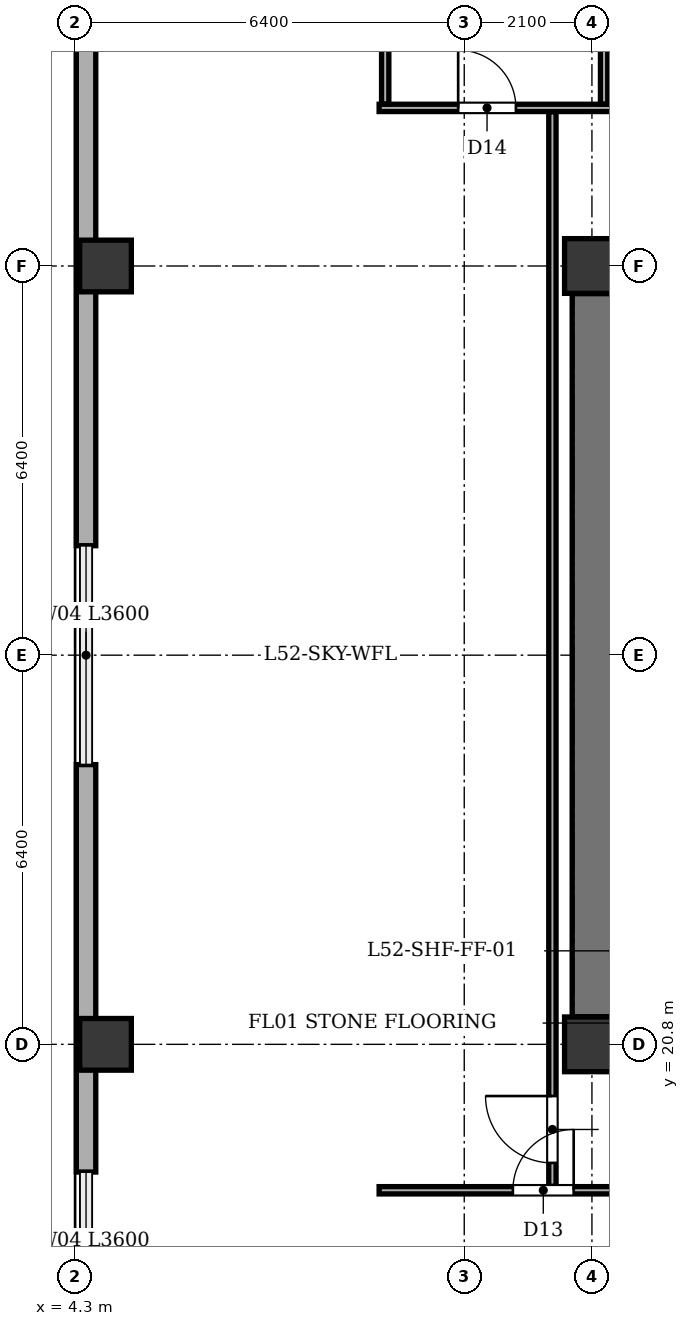
"""IFC4 building model, lengths in metres.
Left out: names, types, materials, properties, quantities, classifications, styles, units other than length and angle.
Written with IfcOpenShell. Run it as: python <this file> out.ifc"""

import sys

from ifc_helpers import new_model, si_unit, direction, frame, frame_2d, origin, origin_2d, place, context, subcontext, project, spatial, rectangle, extrude, element, fill, save


model = new_model("IFC4")
c1 = context("Model", 3, precision=1e-05, world=origin(), true_north=direction((0.0, 1.0)))
c2 = subcontext(c1, "Body", "Model", "MODEL_VIEW")
j1 = project(units=[si_unit("LENGTHUNIT", "METRE"), si_unit("PLANEANGLEUNIT", "RADIAN")], contexts=[c1])
p1 = place(None, origin())
s1 = spatial("IfcSite", under=j1, at=p1, CompositionType="ELEMENT")
p2 = place(p1, origin())
s2 = spatial("IfcBuilding", under=s1, at=p2, CompositionType="ELEMENT")
p3 = place(p2, frame((0.0, 0.0, 202.7)))
s3 = spatial("IfcBuildingStorey", under=s2, at=p3, CompositionType="ELEMENT", Elevation=202.7)
for number, where, z_axis, x_axis in (
    (1, (12.8, 20.8, 0.0), (0.0, 0.0, 1.0), (1.0, 0.0, 0.0)),
    (2, (12.8, 33.6, 0.0), (0.0, 0.0, 1.0), (1.0, 0.0, 0.0)),
):
    element("IfcColumn", number, at=place(p3, frame(where, z_axis=z_axis, x_axis=x_axis)), inside=s3, PredefinedType="COLUMN", context=c2, shape_type="SweptSolid", body=[
        extrude(rectangle(XDim=0.9, YDim=0.9, at=origin_2d()), origin(), (0.0, 0.0, 1.0), 4.8),
    ])
for number, where, z_axis, x_axis in (
    (3, (4.8, 20.8, 0.0), (0.0, 0.0, 1.0), (1.0, 0.0, 0.0)),
    (4, (4.8, 33.6, 0.0), (0.0, 0.0, 1.0), (1.0, 0.0, 0.0)),
):
    element("IfcColumn", number, at=place(p3, frame(where, z_axis=z_axis, x_axis=x_axis)), inside=s3, PredefinedType="COLUMN", context=c2, shape_type="SweptSolid", body=[
        extrude(rectangle(XDim=0.85, YDim=0.85, at=origin_2d()), origin(), (0.0, 0.0, 1.0), 4.8),
    ])
p4 = place(p3, frame((4.48, 18.7, 0.0), z_axis=(0.0, 0.0, 1.0), x_axis=(0.0, 1.0, 0.0)))
e5 = element("IfcWall", 5, at=p4, inside=s3, PredefinedType="STANDARD", context=c2, shape_type="SweptSolid", body=[
    extrude(rectangle(XDim=6.7, YDim=0.32, at=frame_2d((3.35, 0.0))), origin(), (0.0, 0.0, 1.0), 3.735),
])
p5 = place(p3, frame((4.48, 29.0, 0.0), z_axis=(0.0, 0.0, 1.0), x_axis=(0.0, 1.0, 0.0)))
e6 = element("IfcWall", 6, at=p5, inside=s3, PredefinedType="STANDARD", context=c2, shape_type="SweptSolid", body=[
    extrude(rectangle(XDim=18.9, YDim=0.32, at=frame_2d((9.45, 0.0))), origin(), (0.0, 0.0, 1.0), 3.735),
])
p6 = place(p3, frame((12.8, 21.255, 0.0), z_axis=(0.0, 0.0, 1.0), x_axis=(0.0, 1.0, 0.0)))
e7 = element("IfcWall", 7, at=p6, inside=s3, PredefinedType="SHEAR", context=c2, shape_type="SweptSolid", body=[
    extrude(rectangle(XDim=11.89, YDim=0.65, at=frame_2d((5.945, 0.0))), origin(), (0.0, 0.0, 1.0), 4.35),
])
p7 = place(p3, frame((9.3, 18.4, 0.0), z_axis=(0.0, 0.0, 1.0), x_axis=(1.0, 0.0, 0.0)))
e8 = element("IfcWall", 8, at=p7, inside=s3, PredefinedType="PARTITIONING", context=c2, shape_type="SweptSolid", body=[
    extrude(rectangle(XDim=35.0, YDim=0.12, at=frame_2d((17.5, 0.0))), origin(), (0.0, 0.0, 1.0), 4.35),
])
p8 = place(p7, frame((2.2, 0.0, 0.0)))
e9 = element("IfcOpeningElement", 9, at=p8, cuts=e8, PredefinedType="OPENING", context=c2, shape_type="SweptSolid", body=[
    extrude(rectangle(XDim=1.0, YDim=2.1, at=frame_2d((0.5, 1.05))), frame((0.0, 0.07, 0.0), z_axis=(0.0, -1.0, 0.0), x_axis=(1.0, 0.0, 0.0)), (0.0, 0.0, 1.0), 0.14),
])
p9 = place(p7, frame((9.2, 0.0, 0.0)))
e10 = element("IfcOpeningElement", 10, at=p9, cuts=e8, PredefinedType="OPENING", context=c2, shape_type="SweptSolid", body=[
    extrude(rectangle(XDim=1.0, YDim=2.1, at=frame_2d((0.5, 1.05))), frame((0.0, 0.07, 0.0), z_axis=(0.0, -1.0, 0.0), x_axis=(1.0, 0.0, 0.0)), (0.0, 0.0, 1.0), 0.14),
])
p10 = place(p7, frame((16.55, 0.0, 0.0)))
e11 = element("IfcOpeningElement", 11, at=p10, cuts=e8, PredefinedType="OPENING", context=c2, shape_type="SweptSolid", body=[
    extrude(rectangle(XDim=1.0, YDim=2.1, at=frame_2d((0.5, 1.05))), frame((0.0, 0.07, 0.0), z_axis=(0.0, -1.0, 0.0), x_axis=(1.0, 0.0, 0.0)), (0.0, 0.0, 1.0), 0.14),
])
p11 = place(p7, frame((23.9, 0.0, 0.0)))
e12 = element("IfcOpeningElement", 12, at=p11, cuts=e8, PredefinedType="OPENING", context=c2, shape_type="SweptSolid", body=[
    extrude(rectangle(XDim=1.0, YDim=2.1, at=frame_2d((0.5, 1.05))), frame((0.0, 0.07, 0.0), z_axis=(0.0, -1.0, 0.0), x_axis=(1.0, 0.0, 0.0)), (0.0, 0.0, 1.0), 0.14),
])
p12 = place(p7, frame((30.55, 0.0, 0.0)))
e13 = element("IfcOpeningElement", 13, at=p12, cuts=e8, PredefinedType="OPENING", context=c2, shape_type="SweptSolid", body=[
    extrude(rectangle(XDim=1.0, YDim=2.1, at=frame_2d((0.5, 1.05))), frame((0.0, 0.07, 0.0), z_axis=(0.0, -1.0, 0.0), x_axis=(1.0, 0.0, 0.0)), (0.0, 0.0, 1.0), 0.14),
])
p13 = place(p3, frame((9.3, 36.2, 0.0), z_axis=(0.0, 0.0, 1.0), x_axis=(1.0, 0.0, 0.0)))
e14 = element("IfcWall", 14, at=p13, inside=s3, PredefinedType="PARTITIONING", context=c2, shape_type="SweptSolid", body=[
    extrude(rectangle(XDim=35.0, YDim=0.12, at=frame_2d((17.5, 0.0))), origin(), (0.0, 0.0, 1.0), 4.35),
])
p14 = place(p13, frame((1.3, 0.0, 0.0)))
e15 = element("IfcOpeningElement", 15, at=p14, cuts=e14, PredefinedType="OPENING", context=c2, shape_type="SweptSolid", body=[
    extrude(rectangle(XDim=0.95, YDim=2.1, at=frame_2d((0.475, 1.05))), frame((0.0, 0.07, 0.0), z_axis=(0.0, -1.0, 0.0), x_axis=(1.0, 0.0, 0.0)), (0.0, 0.0, 1.0), 0.14),
])
p15 = place(p13, frame((4.9, 0.0, 0.0)))
e16 = element("IfcOpeningElement", 16, at=p15, cuts=e14, PredefinedType="OPENING", context=c2, shape_type="SweptSolid", body=[
    extrude(rectangle(XDim=0.95, YDim=2.1, at=frame_2d((0.475, 1.05))), frame((0.0, 0.07, 0.0), z_axis=(0.0, -1.0, 0.0), x_axis=(1.0, 0.0, 0.0)), (0.0, 0.0, 1.0), 0.14),
])
p16 = place(p13, frame((8.3, 0.0, 0.0)))
e17 = element("IfcOpeningElement", 17, at=p16, cuts=e14, PredefinedType="OPENING", context=c2, shape_type="SweptSolid", body=[
    extrude(rectangle(XDim=1.0, YDim=2.1, at=frame_2d((0.5, 1.05))), frame((0.0, 0.07, 0.0), z_axis=(0.0, -1.0, 0.0), x_axis=(1.0, 0.0, 0.0)), (0.0, 0.0, 1.0), 0.14),
])
p17 = place(p13, frame((13.5, 0.0, 0.0)))
e18 = element("IfcOpeningElement", 18, at=p17, cuts=e14, PredefinedType="OPENING", context=c2, shape_type="SweptSolid", body=[
    extrude(rectangle(XDim=1.5, YDim=2.15, at=frame_2d((0.75, 1.075))), frame((0.0, 0.07, 0.0), z_axis=(0.0, -1.0, 0.0), x_axis=(1.0, 0.0, 0.0)), (0.0, 0.0, 1.0), 0.14),
])
p18 = place(p13, frame((28.0, 0.0, 0.0)))
e19 = element("IfcOpeningElement", 19, at=p18, cuts=e14, PredefinedType="OPENING", context=c2, shape_type="SweptSolid", body=[
    extrude(rectangle(XDim=1.0, YDim=2.1, at=frame_2d((0.5, 1.05))), frame((0.0, 0.07, 0.0), z_axis=(0.0, -1.0, 0.0), x_axis=(1.0, 0.0, 0.0)), (0.0, 0.0, 1.0), 0.14),
])
for number, where, z_axis, x_axis in (
    (20, (9.4, 36.265, 0.0), (0.0, 0.0, 1.0), (0.0, 1.0, 0.0)),
    (21, (13.0, 36.265, 0.0), (0.0, 0.0, 1.0), (0.0, 1.0, 0.0)),
):
    element("IfcWall", number, at=place(p3, frame(where, z_axis=z_axis, x_axis=x_axis)), inside=s3, PredefinedType="PARTITIONING", context=c2, shape_type="SweptSolid", body=[
        extrude(rectangle(XDim=16.29, YDim=0.12, at=frame_2d((8.145, 0.0))), origin(), (0.0, 0.0, 1.0), 4.35),
    ])
p19 = place(p3, frame((12.15, 18.465, 0.0), z_axis=(0.0, 0.0, 1.0), x_axis=(0.0, 1.0, 0.0)))
e22 = element("IfcWall", 22, at=p19, inside=s3, PredefinedType="PARTITIONING", context=c2, shape_type="SweptSolid", body=[
    extrude(rectangle(XDim=17.67, YDim=0.12, at=frame_2d((8.835, 0.0))), origin(), (0.0, 0.0, 1.0), 4.35),
])
p20 = place(p19, frame((0.385, 0.0, 0.0)))
e23 = element("IfcOpeningElement", 23, at=p20, cuts=e22, PredefinedType="OPENING", context=c2, shape_type="SweptSolid", body=[
    extrude(rectangle(XDim=1.1, YDim=2.15, at=frame_2d((0.55, 1.075))), frame((0.0, 0.07, 0.0), z_axis=(0.0, -1.0, 0.0), x_axis=(1.0, 0.0, 0.0)), (0.0, 0.0, 1.0), 0.14),
])
p21 = place(p8, origin())
e24 = element("IfcDoor", 24, at=p21, inside=s3, OperationType="SINGLE_SWING_RIGHT", PredefinedType="DOOR", context=c2, shape_type="SweptSolid", body=[
    extrude(rectangle(XDim=1.0, YDim=2.1, at=frame_2d((0.5, 1.05))), frame((0.0, 0.025, 0.0), z_axis=(0.0, -1.0, 0.0), x_axis=(1.0, 0.0, 0.0)), (0.0, 0.0, 1.0), 0.05),
])
fill(e9, e24)
p22 = place(p14, origin())
e25 = element("IfcDoor", 25, at=p22, inside=s3, OperationType="SINGLE_SWING_LEFT", PredefinedType="DOOR", context=c2, shape_type="SweptSolid", body=[
    extrude(rectangle(XDim=0.95, YDim=2.1, at=frame_2d((0.475, 1.05))), frame((0.0, 0.025, 0.0), z_axis=(0.0, -1.0, 0.0), x_axis=(1.0, 0.0, 0.0)), (0.0, 0.0, 1.0), 0.05),
])
fill(e15, e25)
p23 = place(p20, origin())
e26 = element("IfcDoor", 26, at=p23, inside=s3, OperationType="SINGLE_SWING_RIGHT", PredefinedType="DOOR", context=c2, shape_type="SweptSolid", body=[
    extrude(rectangle(XDim=1.1, YDim=2.15, at=frame_2d((0.55, 1.075))), frame((0.0, 0.025, 0.0), z_axis=(0.0, -1.0, 0.0), x_axis=(1.0, 0.0, 0.0)), (0.0, 0.0, 1.0), 0.05),
])
fill(e23, e26)
save(model, sys.argv[1])
